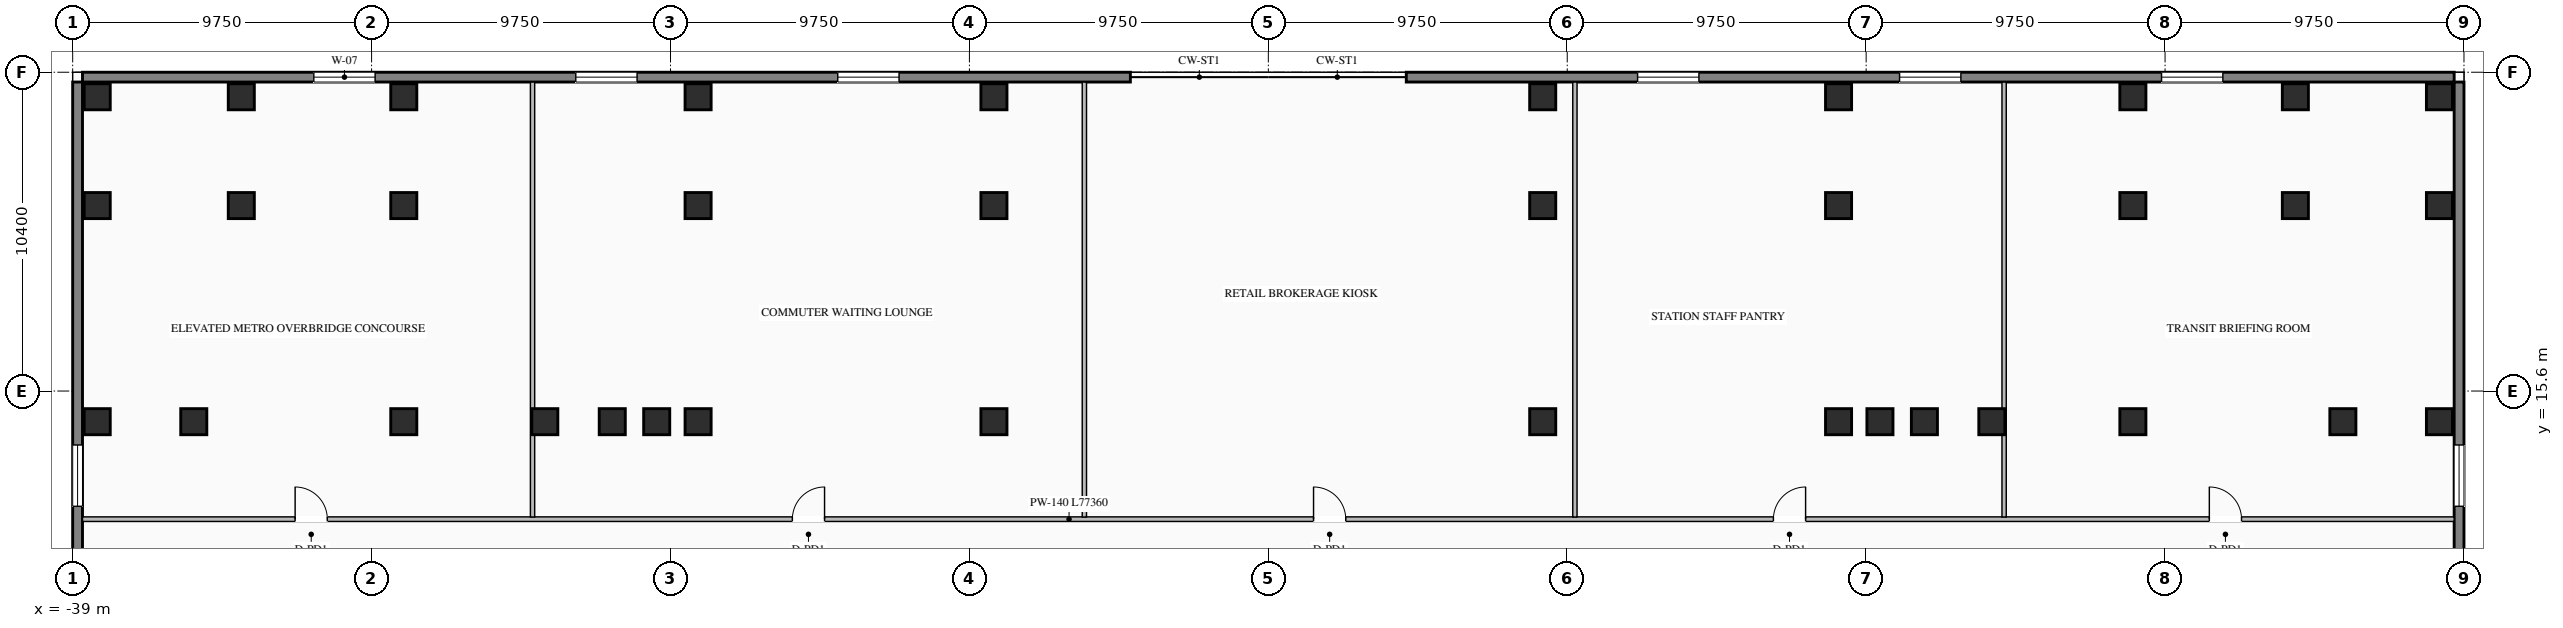
"""IFC4 building model, lengths in metres.
Left out: names, types, materials, properties, quantities, classifications, styles, units other than length and angle.
Written with IfcOpenShell. Run it as: python <this file> out.ifc"""

import sys

from ifc_helpers import new_model, si_unit, direction, frame, frame_2d, origin, origin_2d, place, context, subcontext, project, spatial, rectangle, i_section, extrude, element, fill, save


model = new_model("IFC4")
c1 = context("Model", 3, precision=1e-05, world=origin(), true_north=direction((0.0, 1.0)))
c2 = subcontext(c1, "Body", "Model", "MODEL_VIEW")
j1 = project(units=[si_unit("LENGTHUNIT", "METRE"), si_unit("PLANEANGLEUNIT", "RADIAN")], contexts=[c1])
p1 = place(None, origin())
s1 = spatial("IfcSite", under=j1, at=p1, CompositionType="ELEMENT")
p2 = place(p1, origin())
s2 = spatial("IfcBuilding", under=s1, at=p2, CompositionType="ELEMENT")
p3 = place(p2, frame((0.0, 0.0, 5.1)))
s3 = spatial("IfcBuildingStorey", under=s2, at=p3, CompositionType="ELEMENT", Elevation=5.1)
for number, where, z_axis, x_axis in (
    (1, (-21.4, 14.6, 0.0), (0.0, 0.0, 1.0), (1.0, 0.0, 0.0)),
    (2, (-19.95, 14.6, 0.0), (0.0, 0.0, 1.0), (1.0, 0.0, 0.0)),
    (3, (-18.6, 14.6, 0.0), (0.0, 0.0, 1.0), (1.0, 0.0, 0.0)),
    (4, (-8.95, 14.6, 0.0), (0.0, 0.0, 1.0), (1.0, 0.0, 0.0)),
    (5, (8.95, 14.6, 0.0), (0.0, 0.0, 1.0), (1.0, 0.0, 0.0)),
    (6, (18.6, 14.6, 0.0), (0.0, 0.0, 1.0), (1.0, 0.0, 0.0)),
    (7, (19.95, 14.6, 0.0), (0.0, 0.0, 1.0), (1.0, 0.0, 0.0)),
    (8, (21.4, 14.6, 0.0), (0.0, 0.0, 1.0), (1.0, 0.0, 0.0)),
    (9, (-23.6, 14.6, 0.0), (0.0, 0.0, 1.0), (1.0, 0.0, 0.0)),
    (10, (23.6, 14.6, 0.0), (0.0, 0.0, 1.0), (1.0, 0.0, 0.0)),
    (11, (-28.2, 14.6, 0.0), (0.0, 0.0, 1.0), (1.0, 0.0, 0.0)),
    (12, (28.2, 14.6, 0.0), (0.0, 0.0, 1.0), (1.0, 0.0, 0.0)),
    (13, (-35.05, 14.6, 0.0), (0.0, 0.0, 1.0), (1.0, 0.0, 0.0)),
    (14, (35.05, 14.6, 0.0), (0.0, 0.0, 1.0), (1.0, 0.0, 0.0)),
    (15, (-38.2, 21.65, 0.0), (0.0, 0.0, 1.0), (1.0, 0.0, 0.0)),
    (16, (-33.5, 21.65, 0.0), (0.0, 0.0, 1.0), (1.0, 0.0, 0.0)),
    (17, (-28.2, 21.65, 0.0), (0.0, 0.0, 1.0), (1.0, 0.0, 0.0)),
    (18, (-18.6, 21.65, 0.0), (0.0, 0.0, 1.0), (1.0, 0.0, 0.0)),
    (19, (-8.95, 21.65, 0.0), (0.0, 0.0, 1.0), (1.0, 0.0, 0.0)),
    (20, (8.95, 21.65, 0.0), (0.0, 0.0, 1.0), (1.0, 0.0, 0.0)),
    (21, (18.6, 21.65, 0.0), (0.0, 0.0, 1.0), (1.0, 0.0, 0.0)),
    (22, (28.2, 21.65, 0.0), (0.0, 0.0, 1.0), (1.0, 0.0, 0.0)),
    (23, (33.5, 21.65, 0.0), (0.0, 0.0, 1.0), (1.0, 0.0, 0.0)),
    (24, (38.2, 21.65, 0.0), (0.0, 0.0, 1.0), (1.0, 0.0, 0.0)),
    (25, (-38.2, 25.2, 0.0), (0.0, 0.0, 1.0), (1.0, 0.0, 0.0)),
    (26, (-33.5, 25.2, 0.0), (0.0, 0.0, 1.0), (1.0, 0.0, 0.0)),
    (27, (-28.2, 25.2, 0.0), (0.0, 0.0, 1.0), (1.0, 0.0, 0.0)),
    (28, (-18.6, 25.2, 0.0), (0.0, 0.0, 1.0), (1.0, 0.0, 0.0)),
    (29, (-8.95, 25.2, 0.0), (0.0, 0.0, 1.0), (1.0, 0.0, 0.0)),
    (30, (8.95, 25.2, 0.0), (0.0, 0.0, 1.0), (1.0, 0.0, 0.0)),
    (31, (18.6, 25.2, 0.0), (0.0, 0.0, 1.0), (1.0, 0.0, 0.0)),
    (32, (28.2, 25.2, 0.0), (0.0, 0.0, 1.0), (1.0, 0.0, 0.0)),
    (33, (33.5, 25.2, 0.0), (0.0, 0.0, 1.0), (1.0, 0.0, 0.0)),
    (34, (38.2, 25.2, 0.0), (0.0, 0.0, 1.0), (1.0, 0.0, 0.0)),
    (35, (-38.2, 14.6, 0.0), (0.0, 0.0, 1.0), (1.0, 0.0, 0.0)),
    (36, (38.2, 14.6, 0.0), (0.0, 0.0, 1.0), (1.0, 0.0, 0.0)),
):
    element("IfcColumn", number, at=place(p3, frame(where, z_axis=z_axis, x_axis=x_axis)), inside=s3, PredefinedType="COLUMN", context=c2, shape_type="SweptSolid", body=[
        extrude(i_section(OverallWidth=0.85, OverallDepth=0.85, WebThickness=0.032, FlangeThickness=0.048, at=origin_2d()), origin(), (0.0, 0.0, 1.0), 4.5),
    ])
p4 = place(p3, frame((-38.68, 25.84, 0.0), z_axis=(0.0, 0.0, 1.0), x_axis=(1.0, 0.0, 0.0)))
e37 = element("IfcWall", 37, at=p4, inside=s3, PredefinedType="STANDARD", context=c2, shape_type="SweptSolid", body=[
    extrude(rectangle(XDim=34.18, YDim=0.32, at=frame_2d((17.09, 0.0))), origin(), (0.0, 0.0, 1.0), 4.23),
])
p5 = place(p4, frame((7.545, 0.0, 0.8)))
e38 = element("IfcOpeningElement", 38, at=p5, cuts=e37, PredefinedType="OPENING", context=c2, shape_type="SweptSolid", body=[
    extrude(rectangle(XDim=2.0, YDim=2.2, at=frame_2d((1.0, 1.1))), frame((0.0, 0.17, 0.0), z_axis=(0.0, -1.0, 0.0), x_axis=(1.0, 0.0, 0.0)), (0.0, 0.0, 1.0), 0.34),
])
p6 = place(p4, frame((16.09, 0.0, 0.8)))
e39 = element("IfcOpeningElement", 39, at=p6, cuts=e37, PredefinedType="OPENING", context=c2, shape_type="SweptSolid", body=[
    extrude(rectangle(XDim=2.0, YDim=2.2, at=frame_2d((1.0, 1.1))), frame((0.0, 0.17, 0.0), z_axis=(0.0, -1.0, 0.0), x_axis=(1.0, 0.0, 0.0)), (0.0, 0.0, 1.0), 0.34),
])
p7 = place(p4, frame((24.635, 0.0, 0.8)))
e40 = element("IfcOpeningElement", 40, at=p7, cuts=e37, PredefinedType="OPENING", context=c2, shape_type="SweptSolid", body=[
    extrude(rectangle(XDim=2.0, YDim=2.2, at=frame_2d((1.0, 1.1))), frame((0.0, 0.17, 0.0), z_axis=(0.0, -1.0, 0.0), x_axis=(1.0, 0.0, 0.0)), (0.0, 0.0, 1.0), 0.34),
])
p8 = place(p3, frame((4.5, 25.84, 0.0), z_axis=(0.0, 0.0, 1.0), x_axis=(1.0, 0.0, 0.0)))
e41 = element("IfcWall", 41, at=p8, inside=s3, PredefinedType="STANDARD", context=c2, shape_type="SweptSolid", body=[
    extrude(rectangle(XDim=34.18, YDim=0.32, at=frame_2d((17.09, 0.0))), origin(), (0.0, 0.0, 1.0), 4.23),
])
p9 = place(p8, frame((7.545, 0.0, 0.8)))
e42 = element("IfcOpeningElement", 42, at=p9, cuts=e41, PredefinedType="OPENING", context=c2, shape_type="SweptSolid", body=[
    extrude(rectangle(XDim=2.0, YDim=2.2, at=frame_2d((1.0, 1.1))), frame((0.0, 0.17, 0.0), z_axis=(0.0, -1.0, 0.0), x_axis=(1.0, 0.0, 0.0)), (0.0, 0.0, 1.0), 0.34),
])
p10 = place(p8, frame((16.09, 0.0, 0.8)))
e43 = element("IfcOpeningElement", 43, at=p10, cuts=e41, PredefinedType="OPENING", context=c2, shape_type="SweptSolid", body=[
    extrude(rectangle(XDim=2.0, YDim=2.2, at=frame_2d((1.0, 1.1))), frame((0.0, 0.17, 0.0), z_axis=(0.0, -1.0, 0.0), x_axis=(1.0, 0.0, 0.0)), (0.0, 0.0, 1.0), 0.34),
])
p11 = place(p8, frame((24.635, 0.0, 0.8)))
e44 = element("IfcOpeningElement", 44, at=p11, cuts=e41, PredefinedType="OPENING", context=c2, shape_type="SweptSolid", body=[
    extrude(rectangle(XDim=2.0, YDim=2.2, at=frame_2d((1.0, 1.1))), frame((0.0, 0.17, 0.0), z_axis=(0.0, -1.0, 0.0), x_axis=(1.0, 0.0, 0.0)), (0.0, 0.0, 1.0), 0.34),
])
p12 = place(p3, frame((-38.84, -25.68, 0.0), z_axis=(0.0, 0.0, 1.0), x_axis=(0.0, 1.0, 0.0)))
e45 = element("IfcWall", 45, at=p12, inside=s3, PredefinedType="STANDARD", context=c2, shape_type="SweptSolid", body=[
    extrude(rectangle(XDim=51.36, YDim=0.32, at=frame_2d((25.68, 0.0))), origin(), (0.0, 0.0, 1.0), 4.23),
])
p13 = place(p12, frame((11.84, 0.0, 0.8)))
e46 = element("IfcOpeningElement", 46, at=p13, cuts=e45, PredefinedType="OPENING", context=c2, shape_type="SweptSolid", body=[
    extrude(rectangle(XDim=2.0, YDim=2.2, at=frame_2d((1.0, 1.1))), frame((0.0, 0.17, 0.0), z_axis=(0.0, -1.0, 0.0), x_axis=(1.0, 0.0, 0.0)), (0.0, 0.0, 1.0), 0.34),
])
p14 = place(p12, frame((24.68, 0.0, 0.8)))
e47 = element("IfcOpeningElement", 47, at=p14, cuts=e45, PredefinedType="OPENING", context=c2, shape_type="SweptSolid", body=[
    extrude(rectangle(XDim=2.0, YDim=2.2, at=frame_2d((1.0, 1.1))), frame((0.0, 0.17, 0.0), z_axis=(0.0, -1.0, 0.0), x_axis=(1.0, 0.0, 0.0)), (0.0, 0.0, 1.0), 0.34),
])
p15 = place(p12, frame((37.52, 0.0, 0.8)))
e48 = element("IfcOpeningElement", 48, at=p15, cuts=e45, PredefinedType="OPENING", context=c2, shape_type="SweptSolid", body=[
    extrude(rectangle(XDim=2.0, YDim=2.2, at=frame_2d((1.0, 1.1))), frame((0.0, 0.17, 0.0), z_axis=(0.0, -1.0, 0.0), x_axis=(1.0, 0.0, 0.0)), (0.0, 0.0, 1.0), 0.34),
])
p16 = place(p3, frame((38.84, 25.68, 0.0), z_axis=(0.0, 0.0, 1.0), x_axis=(0.0, -1.0, 0.0)))
e49 = element("IfcWall", 49, at=p16, inside=s3, PredefinedType="STANDARD", context=c2, shape_type="SweptSolid", body=[
    extrude(rectangle(XDim=51.36, YDim=0.32, at=frame_2d((25.68, 0.0))), origin(), (0.0, 0.0, 1.0), 4.23),
])
p17 = place(p16, frame((11.84, 0.0, 0.8)))
e50 = element("IfcOpeningElement", 50, at=p17, cuts=e49, PredefinedType="OPENING", context=c2, shape_type="SweptSolid", body=[
    extrude(rectangle(XDim=2.0, YDim=2.2, at=frame_2d((1.0, 1.1))), frame((0.0, 0.17, 0.0), z_axis=(0.0, -1.0, 0.0), x_axis=(1.0, 0.0, 0.0)), (0.0, 0.0, 1.0), 0.34),
])
p18 = place(p16, frame((24.68, 0.0, 0.8)))
e51 = element("IfcOpeningElement", 51, at=p18, cuts=e49, PredefinedType="OPENING", context=c2, shape_type="SweptSolid", body=[
    extrude(rectangle(XDim=2.0, YDim=2.2, at=frame_2d((1.0, 1.1))), frame((0.0, 0.17, 0.0), z_axis=(0.0, -1.0, 0.0), x_axis=(1.0, 0.0, 0.0)), (0.0, 0.0, 1.0), 0.34),
])
p19 = place(p16, frame((37.52, 0.0, 0.8)))
e52 = element("IfcOpeningElement", 52, at=p19, cuts=e49, PredefinedType="OPENING", context=c2, shape_type="SweptSolid", body=[
    extrude(rectangle(XDim=2.0, YDim=2.2, at=frame_2d((1.0, 1.1))), frame((0.0, 0.17, 0.0), z_axis=(0.0, -1.0, 0.0), x_axis=(1.0, 0.0, 0.0)), (0.0, 0.0, 1.0), 0.34),
])
p20 = place(p3, frame((-38.68, 11.42, 0.0), z_axis=(0.0, 0.0, 1.0), x_axis=(1.0, 0.0, 0.0)))
e53 = element("IfcWall", 53, at=p20, inside=s3, PredefinedType="STANDARD", context=c2, shape_type="SweptSolid", body=[
    extrude(rectangle(XDim=77.36, YDim=0.15, at=frame_2d((38.68, 0.0))), origin(), (0.0, 0.0, 1.0), 4.23),
])
p21 = place(p20, frame((6.936, 0.0, 0.0)))
e54 = element("IfcOpeningElement", 54, at=p21, cuts=e53, PredefinedType="OPENING", context=c2, shape_type="SweptSolid", body=[
    extrude(rectangle(XDim=1.05, YDim=2.08, at=frame_2d((0.525, 1.04))), frame((0.0, 0.085, 0.0), z_axis=(0.0, -1.0, 0.0), x_axis=(1.0, 0.0, 0.0)), (0.0, 0.0, 1.0), 0.17),
])
p22 = place(p20, frame((23.155, 0.0, 0.0)))
e55 = element("IfcOpeningElement", 55, at=p22, cuts=e53, PredefinedType="OPENING", context=c2, shape_type="SweptSolid", body=[
    extrude(rectangle(XDim=1.05, YDim=2.08, at=frame_2d((0.525, 1.04))), frame((0.0, 0.085, 0.0), z_axis=(0.0, -1.0, 0.0), x_axis=(1.0, 0.0, 0.0)), (0.0, 0.0, 1.0), 0.17),
])
p23 = place(p20, frame((40.155, 0.0, 0.0)))
e56 = element("IfcOpeningElement", 56, at=p23, cuts=e53, PredefinedType="OPENING", context=c2, shape_type="SweptSolid", body=[
    extrude(rectangle(XDim=1.05, YDim=2.08, at=frame_2d((0.525, 1.04))), frame((0.0, 0.085, 0.0), z_axis=(0.0, -1.0, 0.0), x_axis=(1.0, 0.0, 0.0)), (0.0, 0.0, 1.0), 0.17),
])
p24 = place(p20, frame((55.155, 0.0, 0.0)))
e57 = element("IfcOpeningElement", 57, at=p24, cuts=e53, PredefinedType="OPENING", context=c2, shape_type="SweptSolid", body=[
    extrude(rectangle(XDim=1.05, YDim=2.08, at=frame_2d((0.525, 1.04))), frame((0.0, 0.085, 0.0), z_axis=(0.0, -1.0, 0.0), x_axis=(1.0, 0.0, 0.0)), (0.0, 0.0, 1.0), 0.17),
])
p25 = place(p20, frame((69.374, 0.0, 0.0)))
e58 = element("IfcOpeningElement", 58, at=p25, cuts=e53, PredefinedType="OPENING", context=c2, shape_type="SweptSolid", body=[
    extrude(rectangle(XDim=1.05, YDim=2.08, at=frame_2d((0.525, 1.04))), frame((0.0, 0.085, 0.0), z_axis=(0.0, -1.0, 0.0), x_axis=(1.0, 0.0, 0.0)), (0.0, 0.0, 1.0), 0.17),
])
for number, where, z_axis, x_axis in (
    (59, (-24.0, 11.49, 0.0), (0.0, 0.0, 1.0), (0.0, 1.0, 0.0)),
    (60, (-6.0, 11.49, 0.0), (0.0, 0.0, 1.0), (0.0, 1.0, 0.0)),
    (61, (10.0, 11.49, 0.0), (0.0, 0.0, 1.0), (0.0, 1.0, 0.0)),
    (62, (24.0, 11.49, 0.0), (0.0, 0.0, 1.0), (0.0, 1.0, 0.0)),
):
    element("IfcWall", number, at=place(p3, frame(where, z_axis=z_axis, x_axis=x_axis)), inside=s3, PredefinedType="STANDARD", context=c2, shape_type="SweptSolid", body=[
        extrude(rectangle(XDim=14.19, YDim=0.14, at=frame_2d((7.095, 0.0))), origin(), (0.0, 0.0, 1.0), 4.23),
    ])
p26 = place(p5, origin())
e63 = element("IfcWindow", 63, at=p26, inside=s3, PartitioningType="DOUBLE_PANEL_VERTICAL", PredefinedType="WINDOW", context=c2, shape_type="SweptSolid", body=[
    extrude(rectangle(XDim=2.0, YDim=2.2, at=frame_2d((1.0, 1.1))), frame((0.0, 0.03, 0.0), z_axis=(0.0, -1.0, 0.0), x_axis=(1.0, 0.0, 0.0)), (0.0, 0.0, 1.0), 0.06),
])
fill(e38, e63)
p27 = place(p6, origin())
e64 = element("IfcWindow", 64, at=p27, inside=s3, PartitioningType="DOUBLE_PANEL_VERTICAL", PredefinedType="WINDOW", context=c2, shape_type="SweptSolid", body=[
    extrude(rectangle(XDim=2.0, YDim=2.2, at=frame_2d((1.0, 1.1))), frame((0.0, 0.03, 0.0), z_axis=(0.0, -1.0, 0.0), x_axis=(1.0, 0.0, 0.0)), (0.0, 0.0, 1.0), 0.06),
])
fill(e39, e64)
p28 = place(p7, origin())
e65 = element("IfcWindow", 65, at=p28, inside=s3, PartitioningType="DOUBLE_PANEL_VERTICAL", PredefinedType="WINDOW", context=c2, shape_type="SweptSolid", body=[
    extrude(rectangle(XDim=2.0, YDim=2.2, at=frame_2d((1.0, 1.1))), frame((0.0, 0.03, 0.0), z_axis=(0.0, -1.0, 0.0), x_axis=(1.0, 0.0, 0.0)), (0.0, 0.0, 1.0), 0.06),
])
fill(e40, e65)
p29 = place(p9, origin())
e66 = element("IfcWindow", 66, at=p29, inside=s3, PartitioningType="DOUBLE_PANEL_VERTICAL", PredefinedType="WINDOW", context=c2, shape_type="SweptSolid", body=[
    extrude(rectangle(XDim=2.0, YDim=2.2, at=frame_2d((1.0, 1.1))), frame((0.0, 0.03, 0.0), z_axis=(0.0, -1.0, 0.0), x_axis=(1.0, 0.0, 0.0)), (0.0, 0.0, 1.0), 0.06),
])
fill(e42, e66)
p30 = place(p10, origin())
e67 = element("IfcWindow", 67, at=p30, inside=s3, PartitioningType="DOUBLE_PANEL_VERTICAL", PredefinedType="WINDOW", context=c2, shape_type="SweptSolid", body=[
    extrude(rectangle(XDim=2.0, YDim=2.2, at=frame_2d((1.0, 1.1))), frame((0.0, 0.03, 0.0), z_axis=(0.0, -1.0, 0.0), x_axis=(1.0, 0.0, 0.0)), (0.0, 0.0, 1.0), 0.06),
])
fill(e43, e67)
p31 = place(p11, origin())
e68 = element("IfcWindow", 68, at=p31, inside=s3, PartitioningType="DOUBLE_PANEL_VERTICAL", PredefinedType="WINDOW", context=c2, shape_type="SweptSolid", body=[
    extrude(rectangle(XDim=2.0, YDim=2.2, at=frame_2d((1.0, 1.1))), frame((0.0, 0.03, 0.0), z_axis=(0.0, -1.0, 0.0), x_axis=(1.0, 0.0, 0.0)), (0.0, 0.0, 1.0), 0.06),
])
fill(e44, e68)
p32 = place(p15, origin())
e69 = element("IfcWindow", 69, at=p32, inside=s3, PartitioningType="DOUBLE_PANEL_VERTICAL", PredefinedType="WINDOW", context=c2, shape_type="SweptSolid", body=[
    extrude(rectangle(XDim=2.0, YDim=2.2, at=frame_2d((1.0, 1.1))), frame((0.0, 0.03, 0.0), z_axis=(0.0, -1.0, 0.0), x_axis=(1.0, 0.0, 0.0)), (0.0, 0.0, 1.0), 0.06),
])
fill(e48, e69)
p33 = place(p17, origin())
e70 = element("IfcWindow", 70, at=p33, inside=s3, PartitioningType="DOUBLE_PANEL_VERTICAL", PredefinedType="WINDOW", context=c2, shape_type="SweptSolid", body=[
    extrude(rectangle(XDim=2.0, YDim=2.2, at=frame_2d((1.0, 1.1))), frame((0.0, 0.03, 0.0), z_axis=(0.0, -1.0, 0.0), x_axis=(1.0, 0.0, 0.0)), (0.0, 0.0, 1.0), 0.06),
])
fill(e50, e70)
p34 = place(p21, origin())
e71 = element("IfcDoor", 71, at=p34, inside=s3, OperationType="SINGLE_SWING_LEFT", PredefinedType="DOOR", context=c2, shape_type="SweptSolid", body=[
    extrude(rectangle(XDim=1.05, YDim=2.08, at=frame_2d((0.525, 1.04))), frame((0.0, 0.025, 0.0), z_axis=(0.0, -1.0, 0.0), x_axis=(1.0, 0.0, 0.0)), (0.0, 0.0, 1.0), 0.05),
])
fill(e54, e71)
p35 = place(p22, origin())
e72 = element("IfcDoor", 72, at=p35, inside=s3, OperationType="SINGLE_SWING_RIGHT", PredefinedType="DOOR", context=c2, shape_type="SweptSolid", body=[
    extrude(rectangle(XDim=1.05, YDim=2.08, at=frame_2d((0.525, 1.04))), frame((0.0, 0.025, 0.0), z_axis=(0.0, -1.0, 0.0), x_axis=(1.0, 0.0, 0.0)), (0.0, 0.0, 1.0), 0.05),
])
fill(e55, e72)
p36 = place(p23, origin())
e73 = element("IfcDoor", 73, at=p36, inside=s3, OperationType="SINGLE_SWING_LEFT", PredefinedType="DOOR", context=c2, shape_type="SweptSolid", body=[
    extrude(rectangle(XDim=1.05, YDim=2.08, at=frame_2d((0.525, 1.04))), frame((0.0, 0.025, 0.0), z_axis=(0.0, -1.0, 0.0), x_axis=(1.0, 0.0, 0.0)), (0.0, 0.0, 1.0), 0.05),
])
fill(e56, e73)
p37 = place(p24, origin())
e74 = element("IfcDoor", 74, at=p37, inside=s3, OperationType="SINGLE_SWING_RIGHT", PredefinedType="DOOR", context=c2, shape_type="SweptSolid", body=[
    extrude(rectangle(XDim=1.05, YDim=2.08, at=frame_2d((0.525, 1.04))), frame((0.0, 0.025, 0.0), z_axis=(0.0, -1.0, 0.0), x_axis=(1.0, 0.0, 0.0)), (0.0, 0.0, 1.0), 0.05),
])
fill(e57, e74)
p38 = place(p25, origin())
e75 = element("IfcDoor", 75, at=p38, inside=s3, OperationType="SINGLE_SWING_LEFT", PredefinedType="DOOR", context=c2, shape_type="SweptSolid", body=[
    extrude(rectangle(XDim=1.05, YDim=2.08, at=frame_2d((0.525, 1.04))), frame((0.0, 0.025, 0.0), z_axis=(0.0, -1.0, 0.0), x_axis=(1.0, 0.0, 0.0)), (0.0, 0.0, 1.0), 0.05),
])
fill(e58, e75)
save(model, sys.argv[1])
